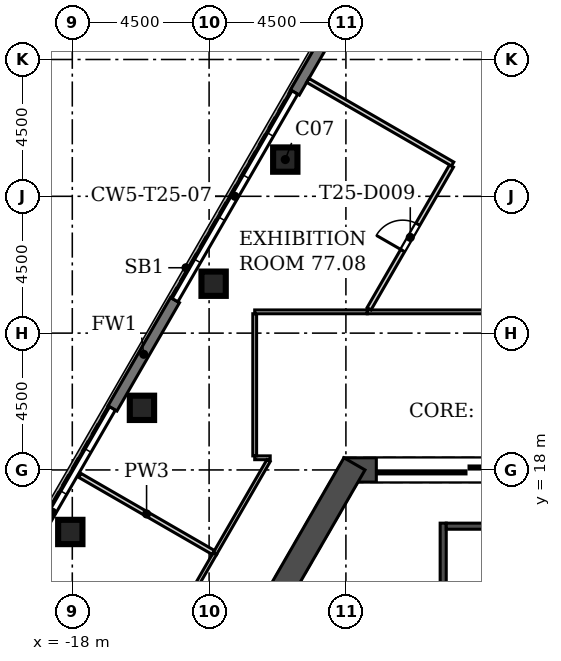
"""IFC4 building model, lengths in metres.
Left out: names, types, materials, properties, quantities, classifications, styles, units other than length and angle.
Written with IfcOpenShell. Run it as: python <this file> out.ifc"""

import sys

from ifc_helpers import new_model, si_unit, direction, frame, frame_2d, origin, origin_2d, place, context, subcontext, project, spatial, rectangle, extrude, element, fill, save


model = new_model("IFC4")
c1 = context("Model", 3, precision=1e-05, world=origin(), true_north=direction((0.0, 1.0)))
c2 = subcontext(c1, "Body", "Model", "MODEL_VIEW")
j1 = project(units=[si_unit("LENGTHUNIT", "METRE"), si_unit("PLANEANGLEUNIT", "RADIAN")], contexts=[c1])
p1 = place(None, origin())
s1 = spatial("IfcSite", under=j1, at=p1, CompositionType="ELEMENT")
p2 = place(p1, origin())
s2 = spatial("IfcBuilding", under=s1, at=p2, CompositionType="ELEMENT")
p3 = place(p2, frame((0.0, 0.0, 339.3)))
s3 = spatial("IfcBuildingStorey", under=s2, at=p3, CompositionType="ELEMENT", Elevation=339.3)
for number, where, z_axis, x_axis in (
    (1, (-10.994, 28.208, 0.0), (0.0, 0.0, 1.0), (1.0, 0.0, 0.0)),
    (2, (-13.352, 24.125, 0.0), (0.0, 0.0, 1.0), (1.0, 0.0, 0.0)),
    (3, (-15.709, 20.042, 0.0), (0.0, 0.0, 1.0), (1.0, 0.0, 0.0)),
    (4, (-18.066, 15.96, 0.0), (0.0, 0.0, 1.0), (1.0, 0.0, 0.0)),
):
    element("IfcColumn", number, at=place(p3, frame(where, z_axis=z_axis, x_axis=x_axis)), inside=s3, PredefinedType="COLUMN", context=c2, shape_type="SweptSolid", body=[
        extrude(rectangle(XDim=0.8, YDim=0.8, at=origin_2d()), origin(), (0.0, 0.0, 1.0), 5.4),
    ])
p4 = place(p3, frame((9.065, 18.0, 0.0), z_axis=(0.0, 0.0, 1.0), x_axis=(-1.0, 0.0, 0.0)))
e5 = element("IfcWall", 5, at=p4, inside=s3, PredefinedType="SHEAR", context=c2, shape_type="SweptSolid", body=[
    extrude(rectangle(XDim=18.13, YDim=0.8, at=frame_2d((9.065, 0.0))), origin(), (0.0, 0.0, 1.0), 5.4),
])
p5 = place(p4, frame((8.365, 0.0, 0.0)))
e6 = element("IfcOpeningElement", 6, at=p5, cuts=e5, PredefinedType="OPENING", context=c2, shape_type="SweptSolid", body=[
    extrude(rectangle(XDim=1.4, YDim=2.1, at=frame_2d((0.7, 1.05))), frame((0.0, 0.41, 0.0), z_axis=(0.0, -1.0, 0.0), x_axis=(1.0, 0.0, 0.0)), (0.0, 0.0, 1.0), 0.82),
])
p6 = place(p4, frame((11.065, 0.0, 0.0)))
e7 = element("IfcOpeningElement", 7, at=p6, cuts=e5, PredefinedType="OPENING", context=c2, shape_type="SweptSolid", body=[
    extrude(rectangle(XDim=6.0, YDim=2.4, at=frame_2d((3.0, 1.2))), frame((0.0, 0.41, 0.0), z_axis=(0.0, -1.0, 0.0), x_axis=(1.0, 0.0, 0.0)), (0.0, 0.0, 1.0), 0.82),
])
p7 = place(p4, frame((1.065, 0.0, 0.0)))
e8 = element("IfcOpeningElement", 8, at=p7, cuts=e5, PredefinedType="OPENING", context=c2, shape_type="SweptSolid", body=[
    extrude(rectangle(XDim=6.0, YDim=2.4, at=frame_2d((3.0, 1.2))), frame((0.0, 0.41, 0.0), z_axis=(0.0, -1.0, 0.0), x_axis=(1.0, 0.0, 0.0)), (0.0, 0.0, 1.0), 0.82),
])
p8 = place(p3, frame((-8.719, 18.2, 0.0), z_axis=(0.0, 0.0, 1.0), x_axis=(-0.500015780397, -0.866016292776, 0.0)))
e9 = element("IfcWall", 9, at=p8, inside=s3, PredefinedType="SHEAR", context=c2, shape_type="SweptSolid", body=[
    extrude(rectangle(XDim=8.67, YDim=0.8, at=frame_2d((4.335, 0.0))), origin(), (0.0, 0.0, 1.0), 5.4),
])
for number, where, z_axis, x_axis in (
    (10, (-8.622, 33.978, 0.0), (0.0, 0.0, 1.0), (-0.5, -0.866, 0.0)),
    (11, (-14.622, 23.586, 0.0), (0.0, 0.0, 1.0), (-0.5, -0.866, 0.0)),
):
    element("IfcWall", number, at=place(p3, frame(where, z_axis=z_axis, x_axis=x_axis)), inside=s3, PredefinedType="SOLIDWALL", context=c2, shape_type="SweptSolid", body=[
        extrude(rectangle(XDim=4.115, YDim=0.34, at=frame_2d((2.058, 0.0))), origin(), (0.0, 0.0, 1.0), 4.6),
    ])
p9 = place(p3, frame((-5.8, 8.25, -0.4), z_axis=(0.0, 0.0, 1.0), x_axis=(0.0, 1.0, 0.0)))
e12 = element("IfcWall", 12, at=p9, inside=s3, PredefinedType="SOLIDWALL", context=c2, shape_type="SweptSolid", body=[
    extrude(rectangle(XDim=8.0, YDim=0.2, at=frame_2d((4.0, 0.0))), origin(), (0.0, 0.0, 1.0), 5.0),
])
p10 = place(p9, frame((0.9, 0.0, 0.4)))
e13 = element("IfcOpeningElement", 13, at=p10, cuts=e12, PredefinedType="OPENING", context=c2, shape_type="SweptSolid", body=[
    extrude(rectangle(XDim=1.0, YDim=2.1, at=frame_2d((0.5, 1.05))), frame((0.0, 0.11, 0.0), z_axis=(0.0, -1.0, 0.0), x_axis=(1.0, 0.0, 0.0)), (0.0, 0.0, 1.0), 0.22),
])
p11 = place(p9, frame((4.8, 0.0, 0.4)))
e14 = element("IfcOpeningElement", 14, at=p11, cuts=e12, PredefinedType="OPENING", context=c2, shape_type="SweptSolid", body=[
    extrude(rectangle(XDim=1.0, YDim=2.1, at=frame_2d((0.5, 1.05))), frame((0.0, 0.11, 0.0), z_axis=(0.0, -1.0, 0.0), x_axis=(1.0, 0.0, 0.0)), (0.0, 0.0, 1.0), 0.22),
])
p12 = place(p3, frame((-5.7, 16.15, -0.4), z_axis=(0.0, 0.0, 1.0), x_axis=(1.0, 0.0, 0.0)))
e15 = element("IfcWall", 15, at=p12, inside=s3, PredefinedType="SOLIDWALL", context=c2, shape_type="SweptSolid", body=[
    extrude(rectangle(XDim=2.0, YDim=0.2, at=frame_2d((1.0, 0.0))), origin(), (0.0, 0.0, 1.0), 5.0),
])
p13 = place(p3, frame((-8.297, 23.2, 0.0), z_axis=(0.0, 0.0, 1.0), x_axis=(1.0, 0.0, 0.0)))
e16 = element("IfcWall", 16, at=p13, inside=s3, PredefinedType="PARTITIONING", context=c2, shape_type="SweptSolid", body=[
    extrude(rectangle(XDim=16.594, YDim=0.125, at=frame_2d((8.297, 0.0))), origin(), (0.0, 0.0, 1.0), 4.6),
])
p14 = place(p13, frame((4.798, 0.0, 0.0)))
e17 = element("IfcOpeningElement", 17, at=p14, cuts=e16, PredefinedType="OPENING", context=c2, shape_type="SweptSolid", body=[
    extrude(rectangle(XDim=1.8, YDim=2.1, at=frame_2d((0.9, 1.05))), frame((0.0, 0.073, 0.0), z_axis=(0.0, -1.0, 0.0), x_axis=(1.0, 0.0, 0.0)), (0.0, 0.0, 1.0), 0.145),
])
p15 = place(p13, frame((7.397, 0.0, 0.0)))
e18 = element("IfcOpeningElement", 18, at=p15, cuts=e16, PredefinedType="OPENING", context=c2, shape_type="SweptSolid", body=[
    extrude(rectangle(XDim=1.8, YDim=2.1, at=frame_2d((0.9, 1.05))), frame((0.0, 0.073, 0.0), z_axis=(0.0, -1.0, 0.0), x_axis=(1.0, 0.0, 0.0)), (0.0, 0.0, 1.0), 0.145),
])
p16 = place(p3, frame((-11.49, 18.4, 0.0), z_axis=(0.0, 0.0, 1.0), x_axis=(-1.0, 0.0, 0.0)))
e19 = element("IfcWall", 19, at=p16, inside=s3, PredefinedType="PARTITIONING", context=c2, shape_type="SweptSolid", body=[
    extrude(rectangle(XDim=0.51, YDim=0.125, at=frame_2d((0.255, 0.0))), origin(), (0.0, 0.0, 1.0), 4.6),
])
p17 = place(p3, frame((-12.0, 18.462, 0.0), z_axis=(0.0, 0.0, 1.0), x_axis=(0.0, 1.0, 0.0)))
e20 = element("IfcWall", 20, at=p17, inside=s3, PredefinedType="PARTITIONING", context=c2, shape_type="SweptSolid", body=[
    extrude(rectangle(XDim=4.675, YDim=0.125, at=frame_2d((2.337, 0.0))), origin(), (0.0, 0.0, 1.0), 4.6),
])
p18 = place(p3, frame((-12.0, 23.2, 0.0), z_axis=(0.0, 0.0, 1.0), x_axis=(1.0, 0.0, 0.0)))
e21 = element("IfcWall", 21, at=p18, inside=s3, PredefinedType="PARTITIONING", context=c2, shape_type="SweptSolid", body=[
    extrude(rectangle(XDim=3.703, YDim=0.125, at=frame_2d((1.852, 0.0))), origin(), (0.0, 0.0, 1.0), 4.6),
])
p19 = place(p3, frame((-13.306, 15.254, 0.0), z_axis=(0.0, 0.0, 1.0), x_axis=(0.499984357326, 0.866034434898, 0.0)))
e22 = element("IfcWall", 22, at=p19, inside=s3, PredefinedType="PARTITIONING", context=c2, shape_type="SweptSolid", body=[
    extrude(rectangle(XDim=3.523, YDim=0.125, at=frame_2d((1.762, 0.0))), origin(), (0.0, 0.0, 1.0), 4.6),
])
p20 = place(p3, frame((-15.5, 11.455, 0.0), z_axis=(0.0, 0.0, 1.0), x_axis=(0.500005024956, 0.866022502605, 0.0)))
e23 = element("IfcWall", 23, at=p20, inside=s3, PredefinedType="PARTITIONING", context=c2, shape_type="SweptSolid", body=[
    extrude(rectangle(XDim=4.388, YDim=0.125, at=frame_2d((2.194, 0.0))), origin(), (0.0, 0.0, 1.0), 4.6),
])
p21 = place(p3, frame((-8.239, 23.3, 0.0), z_axis=(0.0, 0.0, 1.0), x_axis=(0.499997823047, 0.866026660645, 0.0)))
e24 = element("IfcWall", 24, at=p21, inside=s3, PredefinedType="PARTITIONING", context=c2, shape_type="SweptSolid", body=[
    extrude(rectangle(XDim=5.423, YDim=0.15, at=frame_2d((2.712, 0.0))), origin(), (0.0, 0.0, 1.0), 4.6),
])
p22 = place(p21, frame((2.212, 0.0, 0.0)))
e25 = element("IfcOpeningElement", 25, at=p22, cuts=e24, PredefinedType="OPENING", context=c2, shape_type="SweptSolid", body=[
    extrude(rectangle(XDim=1.0, YDim=2.1, at=frame_2d((0.5, 1.05))), frame((0.0, 0.085, 0.0), z_axis=(0.0, -1.0, 0.0), x_axis=(1.0, 0.0, 0.0)), (0.0, 0.0, 1.0), 0.17),
])
p23 = place(p3, frame((-5.49, 28.062, 0.0), z_axis=(0.0, 0.0, 1.0), x_axis=(-0.866027397988, 0.499996545922, 0.0)))
e26 = element("IfcWall", 26, at=p23, inside=s3, PredefinedType="PARTITIONING", context=c2, shape_type="SweptSolid", body=[
    extrude(rectangle(XDim=5.5, YDim=0.15, at=frame_2d((2.75, 0.0))), origin(), (0.0, 0.0, 1.0), 4.6),
])
p24 = place(p3, frame((-13.36, 15.285, 0.0), z_axis=(0.0, 0.0, 1.0), x_axis=(-0.86601005171, 0.50002658963, 0.0)))
e27 = element("IfcWall", 27, at=p24, inside=s3, PredefinedType="PARTITIONING", context=c2, shape_type="SweptSolid", body=[
    extrude(rectangle(XDim=5.073, YDim=0.15, at=frame_2d((2.536, 0.0))), origin(), (0.0, 0.0, 1.0), 4.6),
])
p25 = place(p6, origin())
e28 = element("IfcDoor", 28, at=p25, inside=s3, OperationType="DOUBLE_DOOR_SLIDING", PredefinedType="DOOR", context=c2, shape_type="SweptSolid", body=[
    extrude(rectangle(XDim=6.0, YDim=2.4, at=frame_2d((3.0, 1.2))), frame((0.0, 0.025, 0.0), z_axis=(0.0, -1.0, 0.0), x_axis=(1.0, 0.0, 0.0)), (0.0, 0.0, 1.0), 0.05),
])
fill(e7, e28)
p26 = place(p22, origin())
e29 = element("IfcDoor", 29, at=p26, inside=s3, OperationType="SINGLE_SWING_LEFT", PredefinedType="DOOR", context=c2, shape_type="SweptSolid", body=[
    extrude(rectangle(XDim=1.0, YDim=2.1, at=frame_2d((0.5, 1.05))), frame((0.0, 0.025, 0.0), z_axis=(0.0, -1.0, 0.0), x_axis=(1.0, 0.0, 0.0)), (0.0, 0.0, 1.0), 0.05),
])
fill(e25, e29)
save(model, sys.argv[1])
